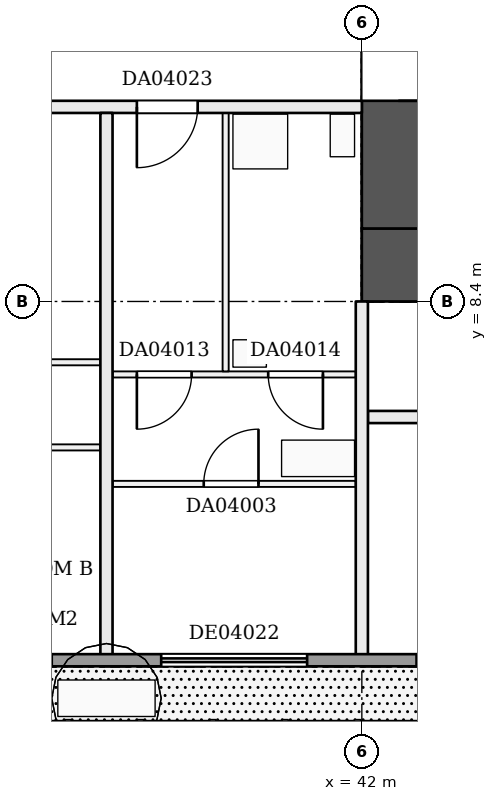
"""IFC4 building model, lengths in metres.
Left out: names, types, materials, properties, quantities, classifications, styles, units other than length and angle.
Written with IfcOpenShell. Run it as: python <this file> out.ifc"""

import sys

from ifc_helpers import new_model, si_unit, direction, frame, frame_2d, origin, place, context, subcontext, project, spatial, rectangle, extrude, element, fill, save


model = new_model("IFC4")
c1 = context("Model", 3, precision=1e-05, world=origin(), true_north=direction((0.0, 1.0)))
c2 = subcontext(c1, "Body", "Model", "MODEL_VIEW")
j1 = project(units=[si_unit("LENGTHUNIT", "METRE"), si_unit("PLANEANGLEUNIT", "RADIAN")], contexts=[c1])
p1 = place(None, origin())
s1 = spatial("IfcSite", under=j1, at=p1, CompositionType="ELEMENT")
p2 = place(p1, origin())
s2 = spatial("IfcBuilding", under=s1, at=p2, CompositionType="ELEMENT")
p3 = place(p2, frame((0.0, 0.0, 25.2)))
s3 = spatial("IfcBuildingStorey", under=s2, at=p3, CompositionType="ELEMENT", Elevation=25.2)
p4 = place(p3, frame((42.0, 9.0, 0.0), z_axis=(0.0, 0.0, 1.0), x_axis=(1.0, 0.0, 0.0)))
e1 = element("IfcWall", 1, at=p4, inside=s3, PredefinedType="SHEAR", context=c2, shape_type="SweptSolid", body=[
    extrude(rectangle(XDim=16.8, YDim=1.2, at=frame_2d((8.4, 0.0))), origin(), (0.0, 0.0, 1.0), 3.22),
])
p5 = place(p4, frame((3.1, 0.0, 0.0)))
e2 = element("IfcOpeningElement", 2, at=p5, cuts=e1, PredefinedType="OPENING", context=c2, shape_type="SweptSolid", body=[
    extrude(rectangle(XDim=1.0, YDim=2.1, at=frame_2d((0.5, 1.05))), frame((0.0, 0.61, 0.0), z_axis=(0.0, -1.0, 0.0), x_axis=(1.0, 0.0, 0.0)), (0.0, 0.0, 1.0), 1.22),
])
p6 = place(p4, frame((12.7, 0.0, 0.0)))
e3 = element("IfcOpeningElement", 3, at=p6, cuts=e1, PredefinedType="OPENING", context=c2, shape_type="SweptSolid", body=[
    extrude(rectangle(XDim=1.0, YDim=2.1, at=frame_2d((0.5, 1.05))), frame((0.0, 0.61, 0.0), z_axis=(0.0, -1.0, 0.0), x_axis=(1.0, 0.0, 0.0)), (0.0, 0.0, 1.0), 1.22),
])
p7 = place(p3, frame((42.6, 9.6, 0.0), z_axis=(0.0, 0.0, 1.0), x_axis=(0.0, 1.0, 0.0)))
e4 = element("IfcWall", 4, at=p7, inside=s3, PredefinedType="SHEAR", context=c2, shape_type="SweptSolid", body=[
    extrude(rectangle(XDim=14.4, YDim=1.2, at=frame_2d((7.2, 0.0))), origin(), (0.0, 0.0, 1.0), 3.22),
])
p8 = place(p7, frame((2.1, 0.0, 0.0)))
e5 = element("IfcOpeningElement", 5, at=p8, cuts=e4, PredefinedType="OPENING", context=c2, shape_type="SweptSolid", body=[
    extrude(rectangle(XDim=1.8, YDim=2.1, at=frame_2d((0.9, 1.05))), frame((0.0, 0.61, 0.0), z_axis=(0.0, -1.0, 0.0), x_axis=(1.0, 0.0, 0.0)), (0.0, 0.0, 1.0), 1.22),
])
p9 = place(p3, frame((37.9, 5.4, 0.0), z_axis=(0.0, 0.0, 1.0), x_axis=(1.0, 0.0, 0.0)))
e6 = element("IfcWall", 6, at=p9, inside=s3, PredefinedType="PARTITIONING", context=c2, shape_type="SweptSolid", body=[
    extrude(rectangle(XDim=4.0, YDim=0.1, at=frame_2d((2.0, 0.0))), origin(), (0.0, 0.0, 1.0), 3.22),
])
p10 = place(p9, frame((1.5, 0.0, 0.0)))
e7 = element("IfcOpeningElement", 7, at=p10, cuts=e6, PredefinedType="OPENING", context=c2, shape_type="SweptSolid", body=[
    extrude(rectangle(XDim=0.9, YDim=2.1, at=frame_2d((0.45, 1.05))), frame((0.0, 0.06, 0.0), z_axis=(0.0, -1.0, 0.0), x_axis=(1.0, 0.0, 0.0)), (0.0, 0.0, 1.0), 0.12),
])
p11 = place(p3, frame((16.85, 6.0, 0.0), z_axis=(0.0, 0.0, 1.0), x_axis=(1.0, 0.0, 0.0)))
e8 = element("IfcWall", 8, at=p11, inside=s3, PredefinedType="PARTITIONING", context=c2, shape_type="SweptSolid", body=[
    extrude(rectangle(XDim=20.85, YDim=0.1, at=frame_2d((10.425, 0.0))), origin(), (0.0, 0.0, 1.0), 3.22),
])
p12 = place(p11, frame((1.55, 0.0, 0.0)))
e9 = element("IfcOpeningElement", 9, at=p12, cuts=e8, PredefinedType="OPENING", context=c2, shape_type="SweptSolid", body=[
    extrude(rectangle(XDim=0.9, YDim=2.1, at=frame_2d((0.45, 1.05))), frame((0.0, 0.06, 0.0), z_axis=(0.0, -1.0, 0.0), x_axis=(1.0, 0.0, 0.0)), (0.0, 0.0, 1.0), 0.12),
])
p13 = place(p11, frame((5.85, 0.0, 0.0)))
e10 = element("IfcOpeningElement", 10, at=p13, cuts=e8, PredefinedType="OPENING", context=c2, shape_type="SweptSolid", body=[
    extrude(rectangle(XDim=0.9, YDim=2.1, at=frame_2d((0.45, 1.05))), frame((0.0, 0.06, 0.0), z_axis=(0.0, -1.0, 0.0), x_axis=(1.0, 0.0, 0.0)), (0.0, 0.0, 1.0), 0.12),
])
p14 = place(p11, frame((9.95, 0.0, 0.0)))
e11 = element("IfcOpeningElement", 11, at=p14, cuts=e8, PredefinedType="OPENING", context=c2, shape_type="SweptSolid", body=[
    extrude(rectangle(XDim=0.9, YDim=2.1, at=frame_2d((0.45, 1.05))), frame((0.0, 0.06, 0.0), z_axis=(0.0, -1.0, 0.0), x_axis=(1.0, 0.0, 0.0)), (0.0, 0.0, 1.0), 0.12),
])
p15 = place(p11, frame((14.15, 0.0, 0.0)))
e12 = element("IfcOpeningElement", 12, at=p15, cuts=e8, PredefinedType="OPENING", context=c2, shape_type="SweptSolid", body=[
    extrude(rectangle(XDim=0.9, YDim=2.1, at=frame_2d((0.45, 1.05))), frame((0.0, 0.06, 0.0), z_axis=(0.0, -1.0, 0.0), x_axis=(1.0, 0.0, 0.0)), (0.0, 0.0, 1.0), 0.12),
])
p16 = place(p11, frame((18.35, 0.0, 0.0)))
e13 = element("IfcOpeningElement", 13, at=p16, cuts=e8, PredefinedType="OPENING", context=c2, shape_type="SweptSolid", body=[
    extrude(rectangle(XDim=0.9, YDim=2.1, at=frame_2d((0.45, 1.05))), frame((0.0, 0.06, 0.0), z_axis=(0.0, -1.0, 0.0), x_axis=(1.0, 0.0, 0.0)), (0.0, 0.0, 1.0), 0.12),
])
p17 = place(p3, frame((42.1, 6.5, 0.0), z_axis=(0.0, 0.0, 1.0), x_axis=(1.0, 0.0, 0.0)))
e14 = element("IfcWall", 14, at=p17, inside=s3, PredefinedType="PARTITIONING", context=c2, shape_type="SweptSolid", body=[
    extrude(rectangle(XDim=18.7, YDim=0.2, at=frame_2d((9.35, 0.0))), origin(), (0.0, 0.0, 1.0), 3.22),
])
p18 = place(p17, frame((1.5, 0.0, 0.0)))
e15 = element("IfcOpeningElement", 15, at=p18, cuts=e14, PredefinedType="OPENING", context=c2, shape_type="SweptSolid", body=[
    extrude(rectangle(XDim=1.0, YDim=2.1, at=frame_2d((0.5, 1.05))), frame((0.0, 0.11, 0.0), z_axis=(0.0, -1.0, 0.0), x_axis=(1.0, 0.0, 0.0)), (0.0, 0.0, 1.0), 0.22),
])
p19 = place(p17, frame((5.7, 0.0, 0.0)))
e16 = element("IfcOpeningElement", 16, at=p19, cuts=e14, PredefinedType="OPENING", context=c2, shape_type="SweptSolid", body=[
    extrude(rectangle(XDim=1.0, YDim=2.1, at=frame_2d((0.5, 1.05))), frame((0.0, 0.11, 0.0), z_axis=(0.0, -1.0, 0.0), x_axis=(1.0, 0.0, 0.0)), (0.0, 0.0, 1.0), 0.22),
])
p20 = place(p17, frame((13.1, 0.0, 0.0)))
e17 = element("IfcOpeningElement", 17, at=p20, cuts=e14, PredefinedType="OPENING", context=c2, shape_type="SweptSolid", body=[
    extrude(rectangle(XDim=1.0, YDim=2.1, at=frame_2d((0.5, 1.05))), frame((0.0, 0.11, 0.0), z_axis=(0.0, -1.0, 0.0), x_axis=(1.0, 0.0, 0.0)), (0.0, 0.0, 1.0), 0.22),
])
p21 = place(p17, frame((17.1, 0.0, 0.0)))
e18 = element("IfcOpeningElement", 18, at=p21, cuts=e14, PredefinedType="OPENING", context=c2, shape_type="SweptSolid", body=[
    extrude(rectangle(XDim=1.0, YDim=2.1, at=frame_2d((0.5, 1.05))), frame((0.0, 0.11, 0.0), z_axis=(0.0, -1.0, 0.0), x_axis=(1.0, 0.0, 0.0)), (0.0, 0.0, 1.0), 0.22),
])
p22 = place(p3, frame((37.9, 7.2, 0.0), z_axis=(0.0, 0.0, 1.0), x_axis=(1.0, 0.0, 0.0)))
e19 = element("IfcWall", 19, at=p22, inside=s3, PredefinedType="PARTITIONING", context=c2, shape_type="SweptSolid", body=[
    extrude(rectangle(XDim=4.0, YDim=0.1, at=frame_2d((2.0, 0.0))), origin(), (0.0, 0.0, 1.0), 3.22),
])
p23 = place(p22, frame((0.4, 0.0, 0.0)))
e20 = element("IfcOpeningElement", 20, at=p23, cuts=e19, PredefinedType="OPENING", context=c2, shape_type="SweptSolid", body=[
    extrude(rectangle(XDim=0.9, YDim=2.1, at=frame_2d((0.45, 1.05))), frame((0.0, 0.06, 0.0), z_axis=(0.0, -1.0, 0.0), x_axis=(1.0, 0.0, 0.0)), (0.0, 0.0, 1.0), 0.12),
])
p24 = place(p22, frame((2.56, 0.0, 0.0)))
e21 = element("IfcOpeningElement", 21, at=p24, cuts=e19, PredefinedType="OPENING", context=c2, shape_type="SweptSolid", body=[
    extrude(rectangle(XDim=0.9, YDim=2.1, at=frame_2d((0.45, 1.05))), frame((0.0, 0.06, 0.0), z_axis=(0.0, -1.0, 0.0), x_axis=(1.0, 0.0, 0.0)), (0.0, 0.0, 1.0), 0.12),
])
p25 = place(p3, frame((21.1, 7.4, 0.0), z_axis=(0.0, 0.0, 1.0), x_axis=(1.0, 0.0, 0.0)))
e22 = element("IfcWall", 22, at=p25, inside=s3, PredefinedType="PARTITIONING", context=c2, shape_type="SweptSolid", body=[
    extrude(rectangle(XDim=16.6, YDim=0.1, at=frame_2d((8.3, 0.0))), origin(), (0.0, 0.0, 1.0), 3.22),
])
p26 = place(p25, frame((14.25, 0.0, 0.0)))
e23 = element("IfcOpeningElement", 23, at=p26, cuts=e22, PredefinedType="OPENING", context=c2, shape_type="SweptSolid", body=[
    extrude(rectangle(XDim=0.9, YDim=2.1, at=frame_2d((0.45, 1.05))), frame((0.0, 0.06, 0.0), z_axis=(0.0, -1.0, 0.0), x_axis=(1.0, 0.0, 0.0)), (0.0, 0.0, 1.0), 0.12),
])
p27 = place(p25, frame((1.3, 0.0, 0.0)))
e24 = element("IfcOpeningElement", 24, at=p27, cuts=e22, PredefinedType="OPENING", context=c2, shape_type="SweptSolid", body=[
    extrude(rectangle(XDim=0.9, YDim=2.1, at=frame_2d((0.45, 1.05))), frame((0.0, 0.06, 0.0), z_axis=(0.0, -1.0, 0.0), x_axis=(1.0, 0.0, 0.0)), (0.0, 0.0, 1.0), 0.12),
])
p28 = place(p25, frame((5.55, 0.0, 0.0)))
e25 = element("IfcOpeningElement", 25, at=p28, cuts=e22, PredefinedType="OPENING", context=c2, shape_type="SweptSolid", body=[
    extrude(rectangle(XDim=0.9, YDim=2.1, at=frame_2d((0.45, 1.05))), frame((0.0, 0.06, 0.0), z_axis=(0.0, -1.0, 0.0), x_axis=(1.0, 0.0, 0.0)), (0.0, 0.0, 1.0), 0.12),
])
p29 = place(p25, frame((10.1, 0.0, 0.0)))
e26 = element("IfcOpeningElement", 26, at=p29, cuts=e22, PredefinedType="OPENING", context=c2, shape_type="SweptSolid", body=[
    extrude(rectangle(XDim=0.9, YDim=2.1, at=frame_2d((0.45, 1.05))), frame((0.0, 0.06, 0.0), z_axis=(0.0, -1.0, 0.0), x_axis=(1.0, 0.0, 0.0)), (0.0, 0.0, 1.0), 0.12),
])
p30 = place(p3, frame((11.5, 11.6, 0.0), z_axis=(0.0, 0.0, 1.0), x_axis=(1.0, 0.0, 0.0)))
e27 = element("IfcWall", 27, at=p30, inside=s3, PredefinedType="PARTITIONING", context=c2, shape_type="SweptSolid", body=[
    extrude(rectangle(XDim=30.5, YDim=0.2, at=frame_2d((15.25, 0.0))), origin(), (0.0, 0.0, 1.0), 3.22),
])
p31 = place(p30, frame((8.04, 0.0, 0.0)))
e28 = element("IfcOpeningElement", 28, at=p31, cuts=e27, PredefinedType="OPENING", context=c2, shape_type="SweptSolid", body=[
    extrude(rectangle(XDim=1.0, YDim=2.1, at=frame_2d((0.5, 1.05))), frame((0.0, 0.11, 0.0), z_axis=(0.0, -1.0, 0.0), x_axis=(1.0, 0.0, 0.0)), (0.0, 0.0, 1.0), 0.22),
])
p32 = place(p30, frame((23.75, 0.0, 0.0)))
e29 = element("IfcOpeningElement", 29, at=p32, cuts=e27, PredefinedType="OPENING", context=c2, shape_type="SweptSolid", body=[
    extrude(rectangle(XDim=1.0, YDim=2.1, at=frame_2d((0.5, 1.05))), frame((0.0, 0.11, 0.0), z_axis=(0.0, -1.0, 0.0), x_axis=(1.0, 0.0, 0.0)), (0.0, 0.0, 1.0), 0.22),
])
p33 = place(p30, frame((26.8, 0.0, 0.0)))
e30 = element("IfcOpeningElement", 30, at=p33, cuts=e27, PredefinedType="OPENING", context=c2, shape_type="SweptSolid", body=[
    extrude(rectangle(XDim=1.0, YDim=2.1, at=frame_2d((0.5, 1.05))), frame((0.0, 0.11, 0.0), z_axis=(0.0, -1.0, 0.0), x_axis=(1.0, 0.0, 0.0)), (0.0, 0.0, 1.0), 0.22),
])
p34 = place(p3, frame((37.8, 2.5, 0.0), z_axis=(0.0, 0.0, 1.0), x_axis=(0.0, 1.0, 0.0)))
e31 = element("IfcWall", 31, at=p34, inside=s3, PredefinedType="PARTITIONING", context=c2, shape_type="SweptSolid", body=[
    extrude(rectangle(XDim=9.0, YDim=0.2, at=frame_2d((4.5, 0.0))), origin(), (0.0, 0.0, 1.0), 3.22),
])
p35 = place(p3, frame((39.76, 7.25, 0.0), z_axis=(0.0, 0.0, 1.0), x_axis=(0.0, 1.0, 0.0)))
e32 = element("IfcWall", 32, at=p35, inside=s3, PredefinedType="PARTITIONING", context=c2, shape_type="SweptSolid", body=[
    extrude(rectangle(XDim=4.25, YDim=0.1, at=frame_2d((2.125, 0.0))), origin(), (0.0, 0.0, 1.0), 3.22),
])
p36 = place(p3, frame((42.0, 2.5, 0.0), z_axis=(0.0, 0.0, 1.0), x_axis=(0.0, 1.0, 0.0)))
e33 = element("IfcWall", 33, at=p36, inside=s3, PredefinedType="PARTITIONING", context=c2, shape_type="SweptSolid", body=[
    extrude(rectangle(XDim=5.9, YDim=0.2, at=frame_2d((2.95, 0.0))), origin(), (0.0, 0.0, 1.0), 3.22),
])
p37 = place(p3, frame((4.8, 2.5, 0.0), z_axis=(0.0, 0.0, 1.0), x_axis=(1.0, 0.0, 0.0)))
e34 = element("IfcWall", 34, at=p37, inside=s3, PredefinedType="SOLIDWALL", context=c2, shape_type="SweptSolid", body=[
    extrude(rectangle(XDim=57.6, YDim=0.2, at=frame_2d((28.8, 0.0))), origin(), (0.0, 0.0, 1.0), 3.22),
])
p38 = place(p37, frame((0.3, 0.0, 0.0)))
e35 = element("IfcOpeningElement", 35, at=p38, cuts=e34, PredefinedType="OPENING", context=c2, shape_type="SweptSolid", body=[
    extrude(rectangle(XDim=2.4, YDim=2.2, at=frame_2d((1.2, 1.1))), frame((0.0, 0.11, 0.0), z_axis=(0.0, -1.0, 0.0), x_axis=(1.0, 0.0, 0.0)), (0.0, 0.0, 1.0), 0.22),
])
p39 = place(p37, frame((4.5, 0.0, 0.0)))
e36 = element("IfcOpeningElement", 36, at=p39, cuts=e34, PredefinedType="OPENING", context=c2, shape_type="SweptSolid", body=[
    extrude(rectangle(XDim=2.4, YDim=2.2, at=frame_2d((1.2, 1.1))), frame((0.0, 0.11, 0.0), z_axis=(0.0, -1.0, 0.0), x_axis=(1.0, 0.0, 0.0)), (0.0, 0.0, 1.0), 0.22),
])
p40 = place(p37, frame((8.7, 0.0, 0.9)))
e37 = element("IfcOpeningElement", 37, at=p40, cuts=e34, PredefinedType="OPENING", context=c2, shape_type="SweptSolid", body=[
    extrude(rectangle(XDim=2.4, YDim=1.5, at=frame_2d((1.2, 0.75))), frame((0.0, 0.11, 0.0), z_axis=(0.0, -1.0, 0.0), x_axis=(1.0, 0.0, 0.0)), (0.0, 0.0, 1.0), 0.22),
])
p41 = place(p37, frame((12.9, 0.0, 0.9)))
e38 = element("IfcOpeningElement", 38, at=p41, cuts=e34, PredefinedType="OPENING", context=c2, shape_type="SweptSolid", body=[
    extrude(rectangle(XDim=2.4, YDim=1.5, at=frame_2d((1.2, 0.75))), frame((0.0, 0.11, 0.0), z_axis=(0.0, -1.0, 0.0), x_axis=(1.0, 0.0, 0.0)), (0.0, 0.0, 1.0), 0.22),
])
p42 = place(p37, frame((17.1, 0.0, 0.0)))
e39 = element("IfcOpeningElement", 39, at=p42, cuts=e34, PredefinedType="OPENING", context=c2, shape_type="SweptSolid", body=[
    extrude(rectangle(XDim=2.4, YDim=2.2, at=frame_2d((1.2, 1.1))), frame((0.0, 0.11, 0.0), z_axis=(0.0, -1.0, 0.0), x_axis=(1.0, 0.0, 0.0)), (0.0, 0.0, 1.0), 0.22),
])
p43 = place(p37, frame((21.3, 0.0, 0.9)))
e40 = element("IfcOpeningElement", 40, at=p43, cuts=e34, PredefinedType="OPENING", context=c2, shape_type="SweptSolid", body=[
    extrude(rectangle(XDim=2.4, YDim=1.5, at=frame_2d((1.2, 0.75))), frame((0.0, 0.11, 0.0), z_axis=(0.0, -1.0, 0.0), x_axis=(1.0, 0.0, 0.0)), (0.0, 0.0, 1.0), 0.22),
])
p44 = place(p37, frame((25.5, 0.0, 0.9)))
e41 = element("IfcOpeningElement", 41, at=p44, cuts=e34, PredefinedType="OPENING", context=c2, shape_type="SweptSolid", body=[
    extrude(rectangle(XDim=2.4, YDim=1.5, at=frame_2d((1.2, 0.75))), frame((0.0, 0.11, 0.0), z_axis=(0.0, -1.0, 0.0), x_axis=(1.0, 0.0, 0.0)), (0.0, 0.0, 1.0), 0.22),
])
p45 = place(p37, frame((29.7, 0.0, 0.9)))
e42 = element("IfcOpeningElement", 42, at=p45, cuts=e34, PredefinedType="OPENING", context=c2, shape_type="SweptSolid", body=[
    extrude(rectangle(XDim=2.4, YDim=1.5, at=frame_2d((1.2, 0.75))), frame((0.0, 0.11, 0.0), z_axis=(0.0, -1.0, 0.0), x_axis=(1.0, 0.0, 0.0)), (0.0, 0.0, 1.0), 0.22),
])
p46 = place(p37, frame((33.9, 0.0, 0.0)))
e43 = element("IfcOpeningElement", 43, at=p46, cuts=e34, PredefinedType="OPENING", context=c2, shape_type="SweptSolid", body=[
    extrude(rectangle(XDim=2.4, YDim=2.2, at=frame_2d((1.2, 1.1))), frame((0.0, 0.11, 0.0), z_axis=(0.0, -1.0, 0.0), x_axis=(1.0, 0.0, 0.0)), (0.0, 0.0, 1.0), 0.22),
])
p47 = place(p37, frame((38.1, 0.0, 0.9)))
e44 = element("IfcOpeningElement", 44, at=p47, cuts=e34, PredefinedType="OPENING", context=c2, shape_type="SweptSolid", body=[
    extrude(rectangle(XDim=2.4, YDim=1.5, at=frame_2d((1.2, 0.75))), frame((0.0, 0.11, 0.0), z_axis=(0.0, -1.0, 0.0), x_axis=(1.0, 0.0, 0.0)), (0.0, 0.0, 1.0), 0.22),
])
p48 = place(p37, frame((42.3, 0.0, 0.9)))
e45 = element("IfcOpeningElement", 45, at=p48, cuts=e34, PredefinedType="OPENING", context=c2, shape_type="SweptSolid", body=[
    extrude(rectangle(XDim=2.4, YDim=1.5, at=frame_2d((1.2, 0.75))), frame((0.0, 0.11, 0.0), z_axis=(0.0, -1.0, 0.0), x_axis=(1.0, 0.0, 0.0)), (0.0, 0.0, 1.0), 0.22),
])
p49 = place(p37, frame((46.5, 0.0, 0.0)))
e46 = element("IfcOpeningElement", 46, at=p49, cuts=e34, PredefinedType="OPENING", context=c2, shape_type="SweptSolid", body=[
    extrude(rectangle(XDim=2.4, YDim=2.2, at=frame_2d((1.2, 1.1))), frame((0.0, 0.11, 0.0), z_axis=(0.0, -1.0, 0.0), x_axis=(1.0, 0.0, 0.0)), (0.0, 0.0, 1.0), 0.22),
])
p50 = place(p37, frame((50.7, 0.0, 0.9)))
e47 = element("IfcOpeningElement", 47, at=p50, cuts=e34, PredefinedType="OPENING", context=c2, shape_type="SweptSolid", body=[
    extrude(rectangle(XDim=2.4, YDim=1.5, at=frame_2d((1.2, 0.75))), frame((0.0, 0.11, 0.0), z_axis=(0.0, -1.0, 0.0), x_axis=(1.0, 0.0, 0.0)), (0.0, 0.0, 1.0), 0.22),
])
p51 = place(p37, frame((54.9, 0.0, 0.9)))
e48 = element("IfcOpeningElement", 48, at=p51, cuts=e34, PredefinedType="OPENING", context=c2, shape_type="SweptSolid", body=[
    extrude(rectangle(XDim=2.4, YDim=1.5, at=frame_2d((1.2, 0.75))), frame((0.0, 0.11, 0.0), z_axis=(0.0, -1.0, 0.0), x_axis=(1.0, 0.0, 0.0)), (0.0, 0.0, 1.0), 0.22),
])
p52 = place(p8, frame((1.8, 0.0, 0.0), z_axis=(0.0, 0.0, 1.0), x_axis=(-1.0, 0.0, 0.0)))
e49 = element("IfcDoor", 49, at=p52, inside=s3, OperationType="DOUBLE_DOOR_SINGLE_SWING", PredefinedType="DOOR", context=c2, shape_type="SweptSolid", body=[
    extrude(rectangle(XDim=1.8, YDim=2.1, at=frame_2d((0.9, 1.05))), frame((0.0, 0.025, 0.0), z_axis=(0.0, -1.0, 0.0), x_axis=(1.0, 0.0, 0.0)), (0.0, 0.0, 1.0), 0.05),
])
fill(e5, e49)
p53 = place(p10, origin())
e50 = element("IfcDoor", 50, at=p53, inside=s3, OperationType="SINGLE_SWING_RIGHT", PredefinedType="DOOR", context=c2, shape_type="SweptSolid", body=[
    extrude(rectangle(XDim=0.9, YDim=2.1, at=frame_2d((0.45, 1.05))), frame((0.0, 0.025, 0.0), z_axis=(0.0, -1.0, 0.0), x_axis=(1.0, 0.0, 0.0)), (0.0, 0.0, 1.0), 0.05),
])
fill(e7, e50)
p54 = place(p23, frame((0.9, 0.0, 0.0), z_axis=(0.0, 0.0, 1.0), x_axis=(-1.0, 0.0, 0.0)))
e51 = element("IfcDoor", 51, at=p54, inside=s3, OperationType="SINGLE_SWING_RIGHT", PredefinedType="DOOR", context=c2, shape_type="SweptSolid", body=[
    extrude(rectangle(XDim=0.9, YDim=2.1, at=frame_2d((0.45, 1.05))), frame((0.0, 0.025, 0.0), z_axis=(0.0, -1.0, 0.0), x_axis=(1.0, 0.0, 0.0)), (0.0, 0.0, 1.0), 0.05),
])
fill(e20, e51)
p55 = place(p24, frame((0.9, 0.0, 0.0), z_axis=(0.0, 0.0, 1.0), x_axis=(-1.0, 0.0, 0.0)))
e52 = element("IfcDoor", 52, at=p55, inside=s3, OperationType="SINGLE_SWING_LEFT", PredefinedType="DOOR", context=c2, shape_type="SweptSolid", body=[
    extrude(rectangle(XDim=0.9, YDim=2.1, at=frame_2d((0.45, 1.05))), frame((0.0, 0.025, 0.0), z_axis=(0.0, -1.0, 0.0), x_axis=(1.0, 0.0, 0.0)), (0.0, 0.0, 1.0), 0.05),
])
fill(e21, e52)
p56 = place(p33, frame((1.0, 0.0, 0.0), z_axis=(0.0, 0.0, 1.0), x_axis=(-1.0, 0.0, 0.0)))
e53 = element("IfcDoor", 53, at=p56, inside=s3, OperationType="SINGLE_SWING_RIGHT", PredefinedType="DOOR", context=c2, shape_type="SweptSolid", body=[
    extrude(rectangle(XDim=1.0, YDim=2.1, at=frame_2d((0.5, 1.05))), frame((0.0, 0.025, 0.0), z_axis=(0.0, -1.0, 0.0), x_axis=(1.0, 0.0, 0.0)), (0.0, 0.0, 1.0), 0.05),
])
fill(e30, e53)
p57 = place(p46, origin())
e54 = element("IfcDoor", 54, at=p57, inside=s3, OperationType="DOUBLE_DOOR_SLIDING", PredefinedType="DOOR", context=c2, shape_type="SweptSolid", body=[
    extrude(rectangle(XDim=2.4, YDim=2.2, at=frame_2d((1.2, 1.1))), frame((0.0, 0.025, 0.0), z_axis=(0.0, -1.0, 0.0), x_axis=(1.0, 0.0, 0.0)), (0.0, 0.0, 1.0), 0.05),
])
fill(e43, e54)
save(model, sys.argv[1])
